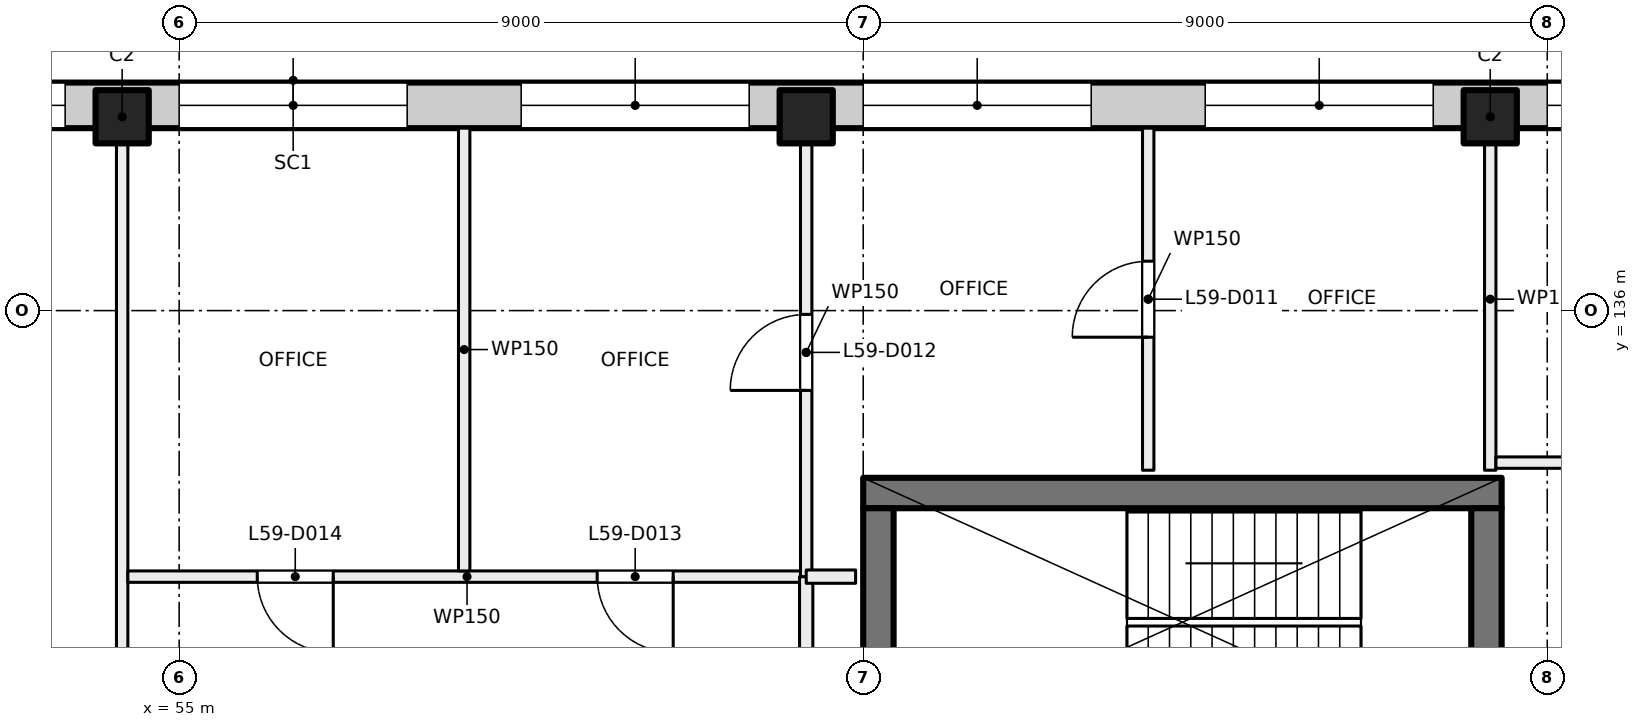
"""IFC4 building model, lengths in metres.
Left out: names, types, materials, properties, quantities, classifications, styles, units other than length and angle.
Written with IfcOpenShell. Run it as: python <this file> out.ifc"""

import sys

from ifc_helpers import new_model, si_unit, direction, frame, frame_2d, origin, origin_2d, place, context, subcontext, project, spatial, rectangle, extrude, element, fill, save


model = new_model("IFC4")
c1 = context("Model", 3, precision=1e-05, world=origin(), true_north=direction((0.0, 1.0)))
c2 = subcontext(c1, "Body", "Model", "MODEL_VIEW")
j1 = project(units=[si_unit("LENGTHUNIT", "METRE"), si_unit("PLANEANGLEUNIT", "RADIAN")], contexts=[c1])
p1 = place(None, origin())
s1 = spatial("IfcSite", under=j1, at=p1, CompositionType="ELEMENT")
p2 = place(p1, origin())
s2 = spatial("IfcBuilding", under=s1, at=p2, CompositionType="ELEMENT")
p3 = place(p2, frame((0.0, 0.0, 249.5)))
s3 = spatial("IfcBuildingStorey", under=s2, at=p3, CompositionType="ELEMENT", Elevation=249.5)
for number, where, z_axis, x_axis in (
    (1, (54.25, 138.55, 0.0), (0.0, 0.0, 1.0), (1.0, 0.0, 0.0)),
    (2, (63.25, 138.55, 0.0), (0.0, 0.0, 1.0), (1.0, 0.0, 0.0)),
    (3, (72.25, 138.55, 0.0), (0.0, 0.0, 1.0), (1.0, 0.0, 0.0)),
):
    element("IfcColumn", number, at=place(p3, frame(where, z_axis=z_axis, x_axis=x_axis)), inside=s3, PredefinedType="COLUMN", context=c2, shape_type="SweptSolid", body=[
        extrude(rectangle(XDim=0.7, YDim=0.7, at=origin_2d()), origin(), (0.0, 0.0, 1.0), 4.0),
    ])
p4 = place(p3, frame((64.0, 133.6, 0.0), z_axis=(0.0, 0.0, 1.0), x_axis=(1.0, 0.0, 0.0)))
e4 = element("IfcWall", 4, at=p4, inside=s3, PredefinedType="SHEAR", context=c2, shape_type="SweptSolid", body=[
    extrude(rectangle(XDim=8.4, YDim=0.4, at=frame_2d((4.2, 0.0))), origin(), (0.0, 0.0, 1.0), 4.0),
])
for number, where, z_axis, x_axis in (
    (5, (64.2, 130.4, 0.0), (0.0, 0.0, 1.0), (0.0, 1.0, 0.0)),
    (6, (72.2, 130.4, 0.0), (0.0, 0.0, 1.0), (0.0, 1.0, 0.0)),
):
    element("IfcWall", number, at=place(p3, frame(where, z_axis=z_axis, x_axis=x_axis)), inside=s3, PredefinedType="SHEAR", context=c2, shape_type="SweptSolid", body=[
        extrude(rectangle(XDim=3.0, YDim=0.4, at=frame_2d((1.5, 0.0))), origin(), (0.0, 0.0, 1.0), 4.0),
    ])
p5 = place(p3, frame((47.07, 138.7, 0.0), z_axis=(0.0, 0.0, 1.0), x_axis=(1.0, 0.0, 0.0)))
e7 = element("IfcWall", 7, at=p5, inside=s3, PredefinedType="SOLIDWALL", context=c2, shape_type="SweptSolid", body=[
    extrude(rectangle(XDim=43.91, YDim=0.6, at=frame_2d((21.955, 0.0))), origin(), (0.0, 0.0, 1.0), 3.625),
])
p6 = place(p5, frame((3.43, 0.0, 0.9)))
e8 = element("IfcOpeningElement", 8, at=p6, cuts=e7, PredefinedType="OPENING", context=c2, shape_type="SweptSolid", body=[
    extrude(rectangle(XDim=3.0, YDim=2.4, at=frame_2d((1.5, 1.2))), frame((0.0, 0.31, 0.0), z_axis=(0.0, -1.0, 0.0), x_axis=(1.0, 0.0, 0.0)), (0.0, 0.0, 1.0), 0.62),
])
p7 = place(p5, frame((7.93, 0.0, 0.9)))
e9 = element("IfcOpeningElement", 9, at=p7, cuts=e7, PredefinedType="OPENING", context=c2, shape_type="SweptSolid", body=[
    extrude(rectangle(XDim=3.0, YDim=2.4, at=frame_2d((1.5, 1.2))), frame((0.0, 0.31, 0.0), z_axis=(0.0, -1.0, 0.0), x_axis=(1.0, 0.0, 0.0)), (0.0, 0.0, 1.0), 0.62),
])
p8 = place(p5, frame((12.43, 0.0, 0.9)))
e10 = element("IfcOpeningElement", 10, at=p8, cuts=e7, PredefinedType="OPENING", context=c2, shape_type="SweptSolid", body=[
    extrude(rectangle(XDim=3.0, YDim=2.4, at=frame_2d((1.5, 1.2))), frame((0.0, 0.31, 0.0), z_axis=(0.0, -1.0, 0.0), x_axis=(1.0, 0.0, 0.0)), (0.0, 0.0, 1.0), 0.62),
])
p9 = place(p5, frame((16.93, 0.0, 0.9)))
e11 = element("IfcOpeningElement", 11, at=p9, cuts=e7, PredefinedType="OPENING", context=c2, shape_type="SweptSolid", body=[
    extrude(rectangle(XDim=3.0, YDim=2.4, at=frame_2d((1.5, 1.2))), frame((0.0, 0.31, 0.0), z_axis=(0.0, -1.0, 0.0), x_axis=(1.0, 0.0, 0.0)), (0.0, 0.0, 1.0), 0.62),
])
p10 = place(p5, frame((21.43, 0.0, 0.9)))
e12 = element("IfcOpeningElement", 12, at=p10, cuts=e7, PredefinedType="OPENING", context=c2, shape_type="SweptSolid", body=[
    extrude(rectangle(XDim=3.0, YDim=2.4, at=frame_2d((1.5, 1.2))), frame((0.0, 0.31, 0.0), z_axis=(0.0, -1.0, 0.0), x_axis=(1.0, 0.0, 0.0)), (0.0, 0.0, 1.0), 0.62),
])
p11 = place(p5, frame((25.93, 0.0, 0.9)))
e13 = element("IfcOpeningElement", 13, at=p11, cuts=e7, PredefinedType="OPENING", context=c2, shape_type="SweptSolid", body=[
    extrude(rectangle(XDim=3.0, YDim=2.4, at=frame_2d((1.5, 1.2))), frame((0.0, 0.31, 0.0), z_axis=(0.0, -1.0, 0.0), x_axis=(1.0, 0.0, 0.0)), (0.0, 0.0, 1.0), 0.62),
])
p12 = place(p5, frame((30.43, 0.0, 0.9)))
e14 = element("IfcOpeningElement", 14, at=p12, cuts=e7, PredefinedType="OPENING", context=c2, shape_type="SweptSolid", body=[
    extrude(rectangle(XDim=3.0, YDim=2.4, at=frame_2d((1.5, 1.2))), frame((0.0, 0.31, 0.0), z_axis=(0.0, -1.0, 0.0), x_axis=(1.0, 0.0, 0.0)), (0.0, 0.0, 1.0), 0.62),
])
p13 = place(p5, frame((34.93, 0.0, 0.9)))
e15 = element("IfcOpeningElement", 15, at=p13, cuts=e7, PredefinedType="OPENING", context=c2, shape_type="SweptSolid", body=[
    extrude(rectangle(XDim=3.0, YDim=2.4, at=frame_2d((1.5, 1.2))), frame((0.0, 0.31, 0.0), z_axis=(0.0, -1.0, 0.0), x_axis=(1.0, 0.0, 0.0)), (0.0, 0.0, 1.0), 0.62),
])
p14 = place(p5, frame((39.43, 0.0, 0.9)))
e16 = element("IfcOpeningElement", 16, at=p14, cuts=e7, PredefinedType="OPENING", context=c2, shape_type="SweptSolid", body=[
    extrude(rectangle(XDim=3.0, YDim=2.4, at=frame_2d((1.5, 1.2))), frame((0.0, 0.31, 0.0), z_axis=(0.0, -1.0, 0.0), x_axis=(1.0, 0.0, 0.0)), (0.0, 0.0, 1.0), 0.62),
])
p15 = place(p3, frame((54.25, 121.35, 0.0), z_axis=(0.0, 0.0, 1.0), x_axis=(0.0, 1.0, 0.0)))
e17 = element("IfcWall", 17, at=p15, inside=s3, PredefinedType="PARTITIONING", context=c2, shape_type="SweptSolid", body=[
    extrude(rectangle(XDim=17.05, YDim=0.15, at=frame_2d((8.525, 0.0))), origin(), (0.0, 0.0, 1.0), 3.625),
])
p16 = place(p3, frame((63.25, 132.5, 0.0), z_axis=(0.0, 0.0, 1.0), x_axis=(-1.0, 0.0, 0.0)))
e18 = element("IfcWall", 18, at=p16, inside=s3, PredefinedType="PARTITIONING", context=c2, shape_type="SweptSolid", body=[
    extrude(rectangle(XDim=8.925, YDim=0.15, at=frame_2d((4.462, 0.0))), origin(), (0.0, 0.0, 1.0), 3.625),
])
p17 = place(p16, frame((1.75, 0.0, 0.0)))
e19 = element("IfcOpeningElement", 19, at=p17, cuts=e18, PredefinedType="OPENING", context=c2, shape_type="SweptSolid", body=[
    extrude(rectangle(XDim=1.0, YDim=2.1, at=frame_2d((0.5, 1.05))), frame((0.0, 0.085, 0.0), z_axis=(0.0, -1.0, 0.0), x_axis=(1.0, 0.0, 0.0)), (0.0, 0.0, 1.0), 0.17),
])
p18 = place(p16, frame((6.222, 0.0, 0.0)))
e20 = element("IfcOpeningElement", 20, at=p18, cuts=e18, PredefinedType="OPENING", context=c2, shape_type="SweptSolid", body=[
    extrude(rectangle(XDim=1.0, YDim=2.1, at=frame_2d((0.5, 1.05))), frame((0.0, 0.085, 0.0), z_axis=(0.0, -1.0, 0.0), x_axis=(1.0, 0.0, 0.0)), (0.0, 0.0, 1.0), 0.17),
])
p19 = place(p3, frame((58.75, 132.575, 0.0), z_axis=(0.0, 0.0, 1.0), x_axis=(0.0, 1.0, 0.0)))
e21 = element("IfcWall", 21, at=p19, inside=s3, PredefinedType="PARTITIONING", context=c2, shape_type="SweptSolid", body=[
    extrude(rectangle(XDim=5.825, YDim=0.15, at=frame_2d((2.913, 0.0))), origin(), (0.0, 0.0, 1.0), 3.625),
])
p20 = place(p3, frame((63.25, 132.5, 0.0), z_axis=(0.0, 0.0, 1.0), x_axis=(0.0, -1.0, 0.0)))
e22 = element("IfcWall", 22, at=p20, inside=s3, PredefinedType="PARTITIONING", context=c2, shape_type="SweptSolid", body=[
    extrude(rectangle(XDim=11.0, YDim=0.175, at=frame_2d((5.5, 0.0))), origin(), (0.0, 0.0, 1.0), 3.625),
])
p21 = place(p20, frame((4.91, 0.0, 0.0)))
e23 = element("IfcOpeningElement", 23, at=p21, cuts=e22, PredefinedType="OPENING", context=c2, shape_type="SweptSolid", body=[
    extrude(rectangle(XDim=1.2, YDim=2.1, at=frame_2d((0.6, 1.05))), frame((0.0, 0.097, 0.0), z_axis=(0.0, -1.0, 0.0), x_axis=(1.0, 0.0, 0.0)), (0.0, 0.0, 1.0), 0.195),
])
p22 = place(p3, frame((63.25, 132.5, 0.0), z_axis=(0.0, 0.0, 1.0), x_axis=(0.0, 1.0, 0.0)))
e24 = element("IfcWall", 24, at=p22, inside=s3, PredefinedType="PARTITIONING", context=c2, shape_type="SweptSolid", body=[
    extrude(rectangle(XDim=5.9, YDim=0.15, at=frame_2d((2.95, 0.0))), origin(), (0.0, 0.0, 1.0), 3.625),
])
p23 = place(p22, frame((2.45, 0.0, 0.0)))
e25 = element("IfcOpeningElement", 25, at=p23, cuts=e24, PredefinedType="OPENING", context=c2, shape_type="SweptSolid", body=[
    extrude(rectangle(XDim=1.0, YDim=2.1, at=frame_2d((0.5, 1.05))), frame((0.0, 0.085, 0.0), z_axis=(0.0, -1.0, 0.0), x_axis=(1.0, 0.0, 0.0)), (0.0, 0.0, 1.0), 0.17),
])
p24 = place(p3, frame((63.9, 132.5, 0.0), z_axis=(0.0, 0.0, 1.0), x_axis=(-1.0, 0.0, 0.0)))
e26 = element("IfcWall", 26, at=p24, inside=s3, PredefinedType="PARTITIONING", context=c2, shape_type="SweptSolid", body=[
    extrude(rectangle(XDim=0.65, YDim=0.175, at=frame_2d((0.325, 0.0))), origin(), (0.0, 0.0, 1.0), 3.625),
])
p25 = place(p3, frame((67.75, 133.9, 0.0), z_axis=(0.0, 0.0, 1.0), x_axis=(0.0, 1.0, 0.0)))
e27 = element("IfcWall", 27, at=p25, inside=s3, PredefinedType="PARTITIONING", context=c2, shape_type="SweptSolid", body=[
    extrude(rectangle(XDim=4.5, YDim=0.15, at=frame_2d((2.25, 0.0))), origin(), (0.0, 0.0, 1.0), 3.625),
])
p26 = place(p25, frame((1.75, 0.0, 0.0)))
e28 = element("IfcOpeningElement", 28, at=p26, cuts=e27, PredefinedType="OPENING", context=c2, shape_type="SweptSolid", body=[
    extrude(rectangle(XDim=1.0, YDim=2.1, at=frame_2d((0.5, 1.05))), frame((0.0, 0.085, 0.0), z_axis=(0.0, -1.0, 0.0), x_axis=(1.0, 0.0, 0.0)), (0.0, 0.0, 1.0), 0.17),
])
p27 = place(p3, frame((72.25, 133.9, 0.0), z_axis=(0.0, 0.0, 1.0), x_axis=(0.0, 1.0, 0.0)))
e29 = element("IfcWall", 29, at=p27, inside=s3, PredefinedType="PARTITIONING", context=c2, shape_type="SweptSolid", body=[
    extrude(rectangle(XDim=4.5, YDim=0.15, at=frame_2d((2.25, 0.0))), origin(), (0.0, 0.0, 1.0), 3.625),
])
p28 = place(p3, frame((81.162, 134.0, 0.0), z_axis=(0.0, 0.0, 1.0), x_axis=(-1.0, 0.0, 0.0)))
e30 = element("IfcWall", 30, at=p28, inside=s3, PredefinedType="PARTITIONING", context=c2, shape_type="SweptSolid", body=[
    extrude(rectangle(XDim=8.837, YDim=0.15, at=frame_2d((4.418, 0.0))), origin(), (0.0, 0.0, 1.0), 3.625),
])
p29 = place(p28, frame((1.696, 0.0, 0.0)))
e31 = element("IfcOpeningElement", 31, at=p29, cuts=e30, PredefinedType="OPENING", context=c2, shape_type="SweptSolid", body=[
    extrude(rectangle(XDim=1.0, YDim=2.1, at=frame_2d((0.5, 1.05))), frame((0.0, 0.085, 0.0), z_axis=(0.0, -1.0, 0.0), x_axis=(1.0, 0.0, 0.0)), (0.0, 0.0, 1.0), 0.17),
])
p30 = place(p28, frame((6.135, 0.0, 0.0)))
e32 = element("IfcOpeningElement", 32, at=p30, cuts=e30, PredefinedType="OPENING", context=c2, shape_type="SweptSolid", body=[
    extrude(rectangle(XDim=1.0, YDim=2.1, at=frame_2d((0.5, 1.05))), frame((0.0, 0.085, 0.0), z_axis=(0.0, -1.0, 0.0), x_axis=(1.0, 0.0, 0.0)), (0.0, 0.0, 1.0), 0.17),
])
p31 = place(p6, origin())
e33 = element("IfcWindow", 33, at=p31, inside=s3, PartitioningType="SINGLE_PANEL", PredefinedType="WINDOW", context=c2, shape_type="SweptSolid", body=[
    extrude(rectangle(XDim=3.0, YDim=2.4, at=frame_2d((1.5, 1.2))), frame((0.0, 0.03, 0.0), z_axis=(0.0, -1.0, 0.0), x_axis=(1.0, 0.0, 0.0)), (0.0, 0.0, 1.0), 0.06),
])
fill(e8, e33)
p32 = place(p7, origin())
e34 = element("IfcWindow", 34, at=p32, inside=s3, PartitioningType="SINGLE_PANEL", PredefinedType="WINDOW", context=c2, shape_type="SweptSolid", body=[
    extrude(rectangle(XDim=3.0, YDim=2.4, at=frame_2d((1.5, 1.2))), frame((0.0, 0.03, 0.0), z_axis=(0.0, -1.0, 0.0), x_axis=(1.0, 0.0, 0.0)), (0.0, 0.0, 1.0), 0.06),
])
fill(e9, e34)
p33 = place(p8, origin())
e35 = element("IfcWindow", 35, at=p33, inside=s3, PartitioningType="SINGLE_PANEL", PredefinedType="WINDOW", context=c2, shape_type="SweptSolid", body=[
    extrude(rectangle(XDim=3.0, YDim=2.4, at=frame_2d((1.5, 1.2))), frame((0.0, 0.03, 0.0), z_axis=(0.0, -1.0, 0.0), x_axis=(1.0, 0.0, 0.0)), (0.0, 0.0, 1.0), 0.06),
])
fill(e10, e35)
p34 = place(p9, origin())
e36 = element("IfcWindow", 36, at=p34, inside=s3, PartitioningType="SINGLE_PANEL", PredefinedType="WINDOW", context=c2, shape_type="SweptSolid", body=[
    extrude(rectangle(XDim=3.0, YDim=2.4, at=frame_2d((1.5, 1.2))), frame((0.0, 0.03, 0.0), z_axis=(0.0, -1.0, 0.0), x_axis=(1.0, 0.0, 0.0)), (0.0, 0.0, 1.0), 0.06),
])
fill(e11, e36)
p35 = place(p10, origin())
e37 = element("IfcWindow", 37, at=p35, inside=s3, PartitioningType="SINGLE_PANEL", PredefinedType="WINDOW", context=c2, shape_type="SweptSolid", body=[
    extrude(rectangle(XDim=3.0, YDim=2.4, at=frame_2d((1.5, 1.2))), frame((0.0, 0.03, 0.0), z_axis=(0.0, -1.0, 0.0), x_axis=(1.0, 0.0, 0.0)), (0.0, 0.0, 1.0), 0.06),
])
fill(e12, e37)
p36 = place(p11, origin())
e38 = element("IfcWindow", 38, at=p36, inside=s3, PartitioningType="SINGLE_PANEL", PredefinedType="WINDOW", context=c2, shape_type="SweptSolid", body=[
    extrude(rectangle(XDim=3.0, YDim=2.4, at=frame_2d((1.5, 1.2))), frame((0.0, 0.03, 0.0), z_axis=(0.0, -1.0, 0.0), x_axis=(1.0, 0.0, 0.0)), (0.0, 0.0, 1.0), 0.06),
])
fill(e13, e38)
p37 = place(p26, origin())
e39 = element("IfcDoor", 39, at=p37, inside=s3, OperationType="SINGLE_SWING_LEFT", PredefinedType="DOOR", context=c2, shape_type="SweptSolid", body=[
    extrude(rectangle(XDim=1.0, YDim=2.1, at=frame_2d((0.5, 1.05))), frame((0.0, 0.025, 0.0), z_axis=(0.0, -1.0, 0.0), x_axis=(1.0, 0.0, 0.0)), (0.0, 0.0, 1.0), 0.05),
])
fill(e28, e39)
p38 = place(p23, origin())
e40 = element("IfcDoor", 40, at=p38, inside=s3, OperationType="SINGLE_SWING_LEFT", PredefinedType="DOOR", context=c2, shape_type="SweptSolid", body=[
    extrude(rectangle(XDim=1.0, YDim=2.1, at=frame_2d((0.5, 1.05))), frame((0.0, 0.025, 0.0), z_axis=(0.0, -1.0, 0.0), x_axis=(1.0, 0.0, 0.0)), (0.0, 0.0, 1.0), 0.05),
])
fill(e25, e40)
p39 = place(p17, origin())
e41 = element("IfcDoor", 41, at=p39, inside=s3, OperationType="SINGLE_SWING_LEFT", PredefinedType="DOOR", context=c2, shape_type="SweptSolid", body=[
    extrude(rectangle(XDim=1.0, YDim=2.1, at=frame_2d((0.5, 1.05))), frame((0.0, 0.025, 0.0), z_axis=(0.0, -1.0, 0.0), x_axis=(1.0, 0.0, 0.0)), (0.0, 0.0, 1.0), 0.05),
])
fill(e19, e41)
p40 = place(p18, origin())
e42 = element("IfcDoor", 42, at=p40, inside=s3, OperationType="SINGLE_SWING_RIGHT", PredefinedType="DOOR", context=c2, shape_type="SweptSolid", body=[
    extrude(rectangle(XDim=1.0, YDim=2.1, at=frame_2d((0.5, 1.05))), frame((0.0, 0.025, 0.0), z_axis=(0.0, -1.0, 0.0), x_axis=(1.0, 0.0, 0.0)), (0.0, 0.0, 1.0), 0.05),
])
fill(e20, e42)
save(model, sys.argv[1])
